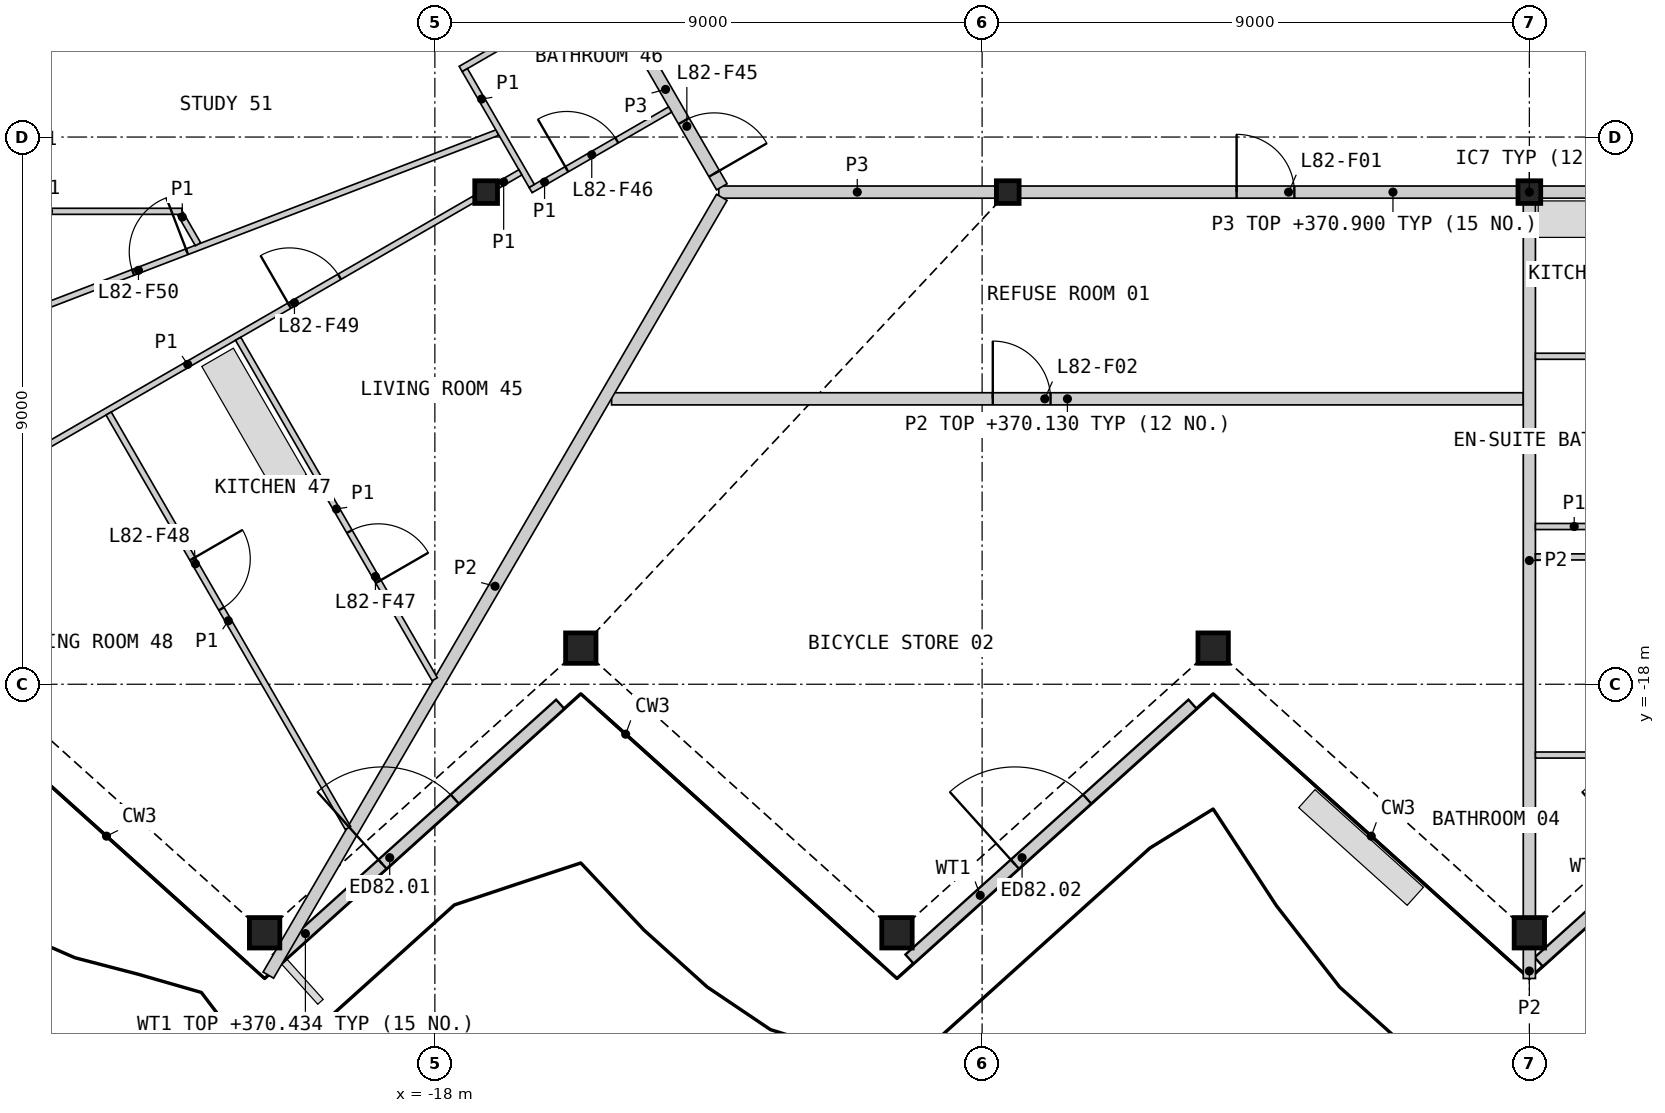
"""IFC4 building model, lengths in metres.
Left out: names, types, materials, properties, quantities, classifications, styles, units other than length and angle.
Written with IfcOpenShell. Run it as: python <this file> out.ifc"""

import sys

from ifc_helpers import new_model, si_unit, direction, frame, frame_2d, origin, origin_2d, place, context, subcontext, project, spatial, rectangle, hollow_rectangle, i_section, extrude, element, fill, save


model = new_model("IFC4")
c1 = context("Model", 3, precision=1e-05, world=origin(), true_north=direction((0.0, 1.0)))
c2 = subcontext(c1, "Body", "Model", "MODEL_VIEW")
j1 = project(units=[si_unit("LENGTHUNIT", "METRE"), si_unit("PLANEANGLEUNIT", "RADIAN")], contexts=[c1])
p1 = place(None, origin())
s1 = spatial("IfcSite", under=j1, at=p1, CompositionType="ELEMENT")
p2 = place(p1, origin())
s2 = spatial("IfcBuilding", under=s1, at=p2, CompositionType="ELEMENT")
p3 = place(p2, frame((0.0, 0.0, 367.8)))
s3 = spatial("IfcBuildingStorey", under=s2, at=p3, CompositionType="ELEMENT", Elevation=367.8)
for number, where, z_axis, x_axis in (
    (1, (-20.8, -22.088, 0.0), (0.0, 0.0, 1.0), (1.0, 0.0, 0.0)),
    (2, (-15.6, -17.406, 0.0), (0.0, 0.0, 1.0), (1.0, 0.0, 0.0)),
    (3, (-10.4, -22.088, 0.0), (0.0, 0.0, 1.0), (1.0, 0.0, 0.0)),
    (4, (-5.2, -17.406, 0.0), (0.0, 0.0, 1.0), (1.0, 0.0, 0.0)),
    (5, (0.0, -22.088, 0.0), (0.0, 0.0, 1.0), (1.0, 0.0, 0.0)),
):
    element("IfcColumn", number, at=place(p3, frame(where, z_axis=z_axis, x_axis=x_axis)), inside=s3, PredefinedType="COLUMN", context=c2, shape_type="SweptSolid", body=[
        extrude(hollow_rectangle(XDim=0.5, YDim=0.5, WallThickness=0.03, at=origin_2d()), origin(), (0.0, 0.0, 1.0), 3.4),
    ])
for number, where, z_axis, x_axis in (
    (6, (-17.157, -9.906, 0.0), (0.0, 0.0, 1.0), (1.0, 0.0, 0.0)),
    (7, (-8.578, -9.906, 0.0), (0.0, 0.0, 1.0), (1.0, 0.0, 0.0)),
    (8, (0.0, -9.906, 0.0), (0.0, 0.0, 1.0), (1.0, 0.0, 0.0)),
):
    element("IfcColumn", number, at=place(p3, frame(where, z_axis=z_axis, x_axis=x_axis)), inside=s3, PredefinedType="COLUMN", context=c2, shape_type="SweptSolid", body=[
        extrude(i_section(OverallWidth=0.374, OverallDepth=0.372, WebThickness=0.016, FlangeThickness=0.026, at=origin_2d()), origin(), (0.0, 0.0, 1.0), 3.4),
    ])
p4 = place(p3, frame((-20.595, -22.52, 0.0), z_axis=(0.0, 0.0, 1.0), x_axis=(0.743137181878, 0.669139095339, 0.0)))
e9 = element("IfcWall", 9, at=p4, inside=s3, PredefinedType="SOLIDWALL", context=c2, shape_type="SweptSolid", body=[
    extrude(rectangle(XDim=6.265, YDim=0.2, at=frame_2d((3.133, 0.0))), origin(), (0.0, 0.0, 1.0), 2.634),
])
p5 = place(p4, frame((2.333, 0.0, 0.0)))
e10 = element("IfcOpeningElement", 10, at=p5, cuts=e9, PredefinedType="OPENING", context=c2, shape_type="SweptSolid", body=[
    extrude(rectangle(XDim=1.6, YDim=2.25, at=frame_2d((0.8, 1.125))), frame((0.0, 0.11, 0.0), z_axis=(0.0, -1.0, 0.0), x_axis=(1.0, 0.0, 0.0)), (0.0, 0.0, 1.0), 0.22),
])
p6 = place(p3, frame((-10.195, -22.52, 0.0), z_axis=(0.0, 0.0, 1.0), x_axis=(0.743137181878, 0.669139095339, 0.0)))
e11 = element("IfcWall", 11, at=p6, inside=s3, PredefinedType="SOLIDWALL", context=c2, shape_type="SweptSolid", body=[
    extrude(rectangle(XDim=6.265, YDim=0.2, at=frame_2d((3.133, 0.0))), origin(), (0.0, 0.0, 1.0), 2.634),
])
p7 = place(p6, frame((2.333, 0.0, 0.0)))
e12 = element("IfcOpeningElement", 12, at=p7, cuts=e11, PredefinedType="OPENING", context=c2, shape_type="SweptSolid", body=[
    extrude(rectangle(XDim=1.6, YDim=2.25, at=frame_2d((0.8, 1.125))), frame((0.0, 0.11, 0.0), z_axis=(0.0, -1.0, 0.0), x_axis=(1.0, 0.0, 0.0)), (0.0, 0.0, 1.0), 0.22),
])
p8 = place(p3, frame((0.154, -22.567, 0.0), z_axis=(0.0, 0.0, 1.0), x_axis=(0.743150529995, 0.669124270796, 0.0)))
e13 = element("IfcWall", 13, at=p8, inside=s3, PredefinedType="SOLIDWALL", context=c2, shape_type="SweptSolid", body=[
    extrude(rectangle(XDim=6.678, YDim=0.2, at=frame_2d((3.339, 0.0))), origin(), (0.0, 0.0, 1.0), 2.634),
])
p9 = place(p8, frame((2.402, 0.0, 0.0)))
e14 = element("IfcOpeningElement", 14, at=p9, cuts=e13, PredefinedType="OPENING", context=c2, shape_type="SweptSolid", body=[
    extrude(rectangle(XDim=1.6, YDim=2.25, at=frame_2d((0.8, 1.125))), frame((0.0, 0.11, 0.0), z_axis=(0.0, -1.0, 0.0), x_axis=(1.0, 0.0, 0.0)), (0.0, 0.0, 1.0), 0.22),
])
p10 = place(p3, frame((-8.382, -9.906, 0.0), z_axis=(0.0, 0.0, 1.0), x_axis=(1.0, 0.0, 0.0)))
e15 = element("IfcWall", 15, at=p10, inside=s3, PredefinedType="PARTITIONING", context=c2, shape_type="SweptSolid", body=[
    extrude(rectangle(XDim=8.185, YDim=0.2, at=frame_2d((4.092, 0.0))), origin(), (0.0, 0.0, 1.0), 3.1),
])
p11 = place(p10, frame((3.567, 0.0, 0.0)))
e16 = element("IfcOpeningElement", 16, at=p11, cuts=e15, PredefinedType="OPENING", context=c2, shape_type="SweptSolid", body=[
    extrude(rectangle(XDim=0.95, YDim=2.1, at=frame_2d((0.475, 1.05))), frame((0.0, 0.11, 0.0), z_axis=(0.0, -1.0, 0.0), x_axis=(1.0, 0.0, 0.0)), (0.0, 0.0, 1.0), 0.22),
])
p12 = place(p3, frame((0.197, -9.906, 0.0), z_axis=(0.0, 0.0, 1.0), x_axis=(1.0, 0.0, 0.0)))
e17 = element("IfcWall", 17, at=p12, inside=s3, PredefinedType="PARTITIONING", context=c2, shape_type="SweptSolid", body=[
    extrude(rectangle(XDim=8.185, YDim=0.2, at=frame_2d((4.092, 0.0))), origin(), (0.0, 0.0, 1.0), 3.1),
])
p13 = place(p12, frame((3.39, 0.0, 0.0)))
e18 = element("IfcOpeningElement", 18, at=p13, cuts=e17, PredefinedType="OPENING", context=c2, shape_type="SweptSolid", body=[
    extrude(rectangle(XDim=1.0, YDim=2.1, at=frame_2d((0.5, 1.05))), frame((0.0, 0.11, 0.0), z_axis=(0.0, -1.0, 0.0), x_axis=(1.0, 0.0, 0.0)), (0.0, 0.0, 1.0), 0.22),
])
p14 = place(p3, frame((-13.331, -9.906, 0.0), z_axis=(0.0, 0.0, 1.0), x_axis=(1.0, 0.0, 0.0)))
e19 = element("IfcWall", 19, at=p14, inside=s3, PredefinedType="PARTITIONING", context=c2, shape_type="SweptSolid", body=[
    extrude(rectangle(XDim=4.555, YDim=0.2, at=frame_2d((2.278, 0.0))), origin(), (0.0, 0.0, 1.0), 3.1),
])
p15 = place(p3, frame((-15.131, -6.614, 0.0), z_axis=(0.0, 0.0, 1.0), x_axis=(0.499948957823, -0.866054870994, 0.0)))
e20 = element("IfcWall", 20, at=p15, inside=s3, PredefinedType="PARTITIONING", context=c2, shape_type="SweptSolid", body=[
    extrude(rectangle(XDim=3.701, YDim=0.2, at=frame_2d((1.851, 0.0))), origin(), (0.0, 0.0, 1.0), 3.1),
])
p16 = place(p15, frame((2.451, 0.0, 0.0)))
e21 = element("IfcOpeningElement", 21, at=p16, cuts=e20, PredefinedType="OPENING", context=c2, shape_type="SweptSolid", body=[
    extrude(rectangle(XDim=1.0, YDim=2.1, at=frame_2d((0.5, 1.05))), frame((0.0, 0.11, 0.0), z_axis=(0.0, -1.0, 0.0), x_axis=(1.0, 0.0, 0.0)), (0.0, 0.0, 1.0), 0.22),
])
p17 = place(p3, frame((-15.094, -13.306, 0.0), z_axis=(0.0, 0.0, 1.0), x_axis=(1.0, 0.0, 0.0)))
e22 = element("IfcWall", 22, at=p17, inside=s3, PredefinedType="PARTITIONING", context=c2, shape_type="SweptSolid", body=[
    extrude(rectangle(XDim=14.994, YDim=0.2, at=frame_2d((7.497, 0.0))), origin(), (0.0, 0.0, 1.0), 2.33),
])
p18 = place(p17, frame((6.27, 0.0, 0.0)))
e23 = element("IfcOpeningElement", 23, at=p18, cuts=e22, PredefinedType="OPENING", context=c2, shape_type="SweptSolid", body=[
    extrude(rectangle(XDim=0.95, YDim=2.1, at=frame_2d((0.475, 1.05))), frame((0.0, 0.11, 0.0), z_axis=(0.0, -1.0, 0.0), x_axis=(1.0, 0.0, 0.0)), (0.0, 0.0, 1.0), 0.22),
])
p19 = place(p3, frame((-20.739, -22.784, 0.0), z_axis=(0.0, 0.0, 1.0), x_axis=(0.50362599185, 0.863921790635, 0.0)))
e24 = element("IfcWall", 24, at=p19, inside=s3, PredefinedType="PARTITIONING", context=c2, shape_type="SweptSolid", body=[
    extrude(rectangle(XDim=14.807, YDim=0.2, at=frame_2d((7.404, 0.0))), origin(), (0.0, 0.0, 1.0), 2.33),
])
p20 = place(p3, frame((0.0, -21.828, 0.0), z_axis=(0.0, 0.0, 1.0), x_axis=(0.0, 1.0, 0.0)))
e25 = element("IfcWall", 25, at=p20, inside=s3, PredefinedType="PARTITIONING", context=c2, shape_type="SweptSolid", body=[
    extrude(rectangle(XDim=11.725, YDim=0.2, at=frame_2d((5.863, 0.0))), origin(), (0.0, 0.0, 1.0), 2.33),
])
p21 = place(p3, frame((0.0, -22.839, 0.0), z_axis=(0.0, 0.0, 1.0), x_axis=(0.0, 1.0, 0.0)))
e26 = element("IfcWall", 26, at=p21, inside=s3, PredefinedType="PARTITIONING", context=c2, shape_type="SweptSolid", body=[
    extrude(rectangle(XDim=0.491, YDim=0.2, at=frame_2d((0.246, 0.0))), origin(), (0.0, 0.0, 1.0), 2.33),
])
p22 = place(p3, frame((-28.725, -13.438, 0.0), z_axis=(0.0, 0.0, 1.0), x_axis=(0.933580312145, 0.358368247444, 0.0)))
e27 = element("IfcWall", 27, at=p22, inside=s3, PredefinedType="PARTITIONING", context=c2, shape_type="SweptSolid", body=[
    extrude(rectangle(XDim=12.59, YDim=0.1, at=frame_2d((6.295, 0.0))), origin(), (0.0, 0.0, 1.0), 2.33),
])
p23 = place(p22, frame((6.171, 0.0, 0.0)))
e28 = element("IfcOpeningElement", 28, at=p23, cuts=e27, PredefinedType="OPENING", context=c2, shape_type="SweptSolid", body=[
    extrude(rectangle(XDim=0.95, YDim=2.1, at=frame_2d((0.475, 1.05))), frame((0.0, 0.06, 0.0), z_axis=(0.0, -1.0, 0.0), x_axis=(1.0, 0.0, 0.0)), (0.0, 0.0, 1.0), 0.12),
])
p24 = place(p3, frame((-26.777, -15.46, 0.0), z_axis=(0.0, 0.0, 1.0), x_axis=(0.866019680922, 0.500009912158, 0.0)))
e29 = element("IfcWall", 29, at=p24, inside=s3, PredefinedType="PARTITIONING", context=c2, shape_type="SweptSolid", body=[
    extrude(rectangle(XDim=10.881, YDim=0.1, at=frame_2d((5.44, 0.0))), origin(), (0.0, 0.0, 1.0), 2.33),
])
p25 = place(p24, frame((7.373, 0.0, 0.0)))
e30 = element("IfcOpeningElement", 30, at=p25, cuts=e29, PredefinedType="OPENING", context=c2, shape_type="SweptSolid", body=[
    extrude(rectangle(XDim=0.95, YDim=2.1, at=frame_2d((0.475, 1.05))), frame((0.0, 0.06, 0.0), z_axis=(0.0, -1.0, 0.0), x_axis=(1.0, 0.0, 0.0)), (0.0, 0.0, 1.0), 0.12),
])
p26 = place(p3, frame((-23.365, -13.548, 0.0), z_axis=(0.0, 0.0, 1.0), x_axis=(0.500011483804, -0.866018773506, 0.0)))
e31 = element("IfcWall", 31, at=p26, inside=s3, PredefinedType="PARTITIONING", context=c2, shape_type="SweptSolid", body=[
    extrude(rectangle(XDim=7.872, YDim=0.1, at=frame_2d((3.936, 0.0))), origin(), (0.0, 0.0, 1.0), 2.33),
])
p27 = place(p26, frame((2.759, 0.0, 0.0)))
e32 = element("IfcOpeningElement", 32, at=p27, cuts=e31, PredefinedType="OPENING", context=c2, shape_type="SweptSolid", body=[
    extrude(rectangle(XDim=0.95, YDim=2.1, at=frame_2d((0.475, 1.05))), frame((0.0, 0.06, 0.0), z_axis=(0.0, -1.0, 0.0), x_axis=(1.0, 0.0, 0.0)), (0.0, 0.0, 1.0), 0.12),
])
p28 = place(p3, frame((-21.235, -12.318, 0.0), z_axis=(0.0, 0.0, 1.0), x_axis=(0.500008973052, -0.866020223129, 0.0)))
e33 = element("IfcWall", 33, at=p28, inside=s3, PredefinedType="PARTITIONING", context=c2, shape_type="SweptSolid", body=[
    extrude(rectangle(XDim=6.466, YDim=0.1, at=frame_2d((3.233, 0.0))), origin(), (0.0, 0.0, 1.0), 2.33),
])
p29 = place(p28, frame((3.661, 0.0, 0.0)))
e34 = element("IfcOpeningElement", 34, at=p29, cuts=e33, PredefinedType="OPENING", context=c2, shape_type="SweptSolid", body=[
    extrude(rectangle(XDim=0.95, YDim=2.1, at=frame_2d((0.475, 1.05))), frame((0.0, 0.06, 0.0), z_axis=(0.0, -1.0, 0.0), x_axis=(1.0, 0.0, 0.0)), (0.0, 0.0, 1.0), 0.12),
])
p30 = place(p3, frame((-26.549, -10.222, 0.0), z_axis=(0.0, 0.0, 1.0), x_axis=(1.0, 0.0, 0.0)))
e35 = element("IfcWall", 35, at=p30, inside=s3, PredefinedType="PARTITIONING", context=c2, shape_type="SweptSolid", body=[
    extrude(rectangle(XDim=4.391, YDim=0.1, at=frame_2d((2.195, 0.0))), origin(), (0.0, 0.0, 1.0), 2.33),
])
p31 = place(p3, frame((0.1, -19.164, 0.0), z_axis=(0.0, 0.0, 1.0), x_axis=(1.0, 0.0, 0.0)))
e36 = element("IfcWall", 36, at=p31, inside=s3, PredefinedType="PARTITIONING", context=c2, shape_type="SweptSolid", body=[
    extrude(rectangle(XDim=3.751, YDim=0.1, at=frame_2d((1.876, 0.0))), origin(), (0.0, 0.0, 1.0), 2.33),
])
p32 = place(p31, frame((2.579, 0.0, 0.0)))
e37 = element("IfcOpeningElement", 37, at=p32, cuts=e36, PredefinedType="OPENING", context=c2, shape_type="SweptSolid", body=[
    extrude(rectangle(XDim=0.95, YDim=2.1, at=frame_2d((0.475, 1.05))), frame((0.0, 0.06, 0.0), z_axis=(0.0, -1.0, 0.0), x_axis=(1.0, 0.0, 0.0)), (0.0, 0.0, 1.0), 0.12),
])
p33 = place(p3, frame((0.1, -15.906, 0.0), z_axis=(0.0, 0.0, 1.0), x_axis=(1.0, 0.0, 0.0)))
e38 = element("IfcWall", 38, at=p33, inside=s3, PredefinedType="PARTITIONING", context=c2, shape_type="SweptSolid", body=[
    extrude(rectangle(XDim=2.85, YDim=0.1, at=frame_2d((1.425, 0.0))), origin(), (0.0, 0.0, 1.0), 2.33),
])
p34 = place(p3, frame((0.1, -12.606, 0.0), z_axis=(0.0, 0.0, 1.0), x_axis=(1.0, 0.0, 0.0)))
e39 = element("IfcWall", 39, at=p34, inside=s3, PredefinedType="PARTITIONING", context=c2, shape_type="SweptSolid", body=[
    extrude(rectangle(XDim=2.55, YDim=0.1, at=frame_2d((1.275, 0.0))), origin(), (0.0, 0.0, 1.0), 2.33),
])
p35 = place(p3, frame((0.1, -15.406, 0.0), z_axis=(0.0, 0.0, 1.0), x_axis=(1.0, 0.0, 0.0)))
e40 = element("IfcWall", 40, at=p35, inside=s3, PredefinedType="PARTITIONING", context=c2, shape_type="SweptSolid", body=[
    extrude(rectangle(XDim=2.55, YDim=0.1, at=frame_2d((1.275, 0.0))), origin(), (0.0, 0.0, 1.0), 2.33),
])
p36 = place(p35, frame((1.35, 0.0, 0.0)))
e41 = element("IfcOpeningElement", 41, at=p36, cuts=e40, PredefinedType="OPENING", context=c2, shape_type="SweptSolid", body=[
    extrude(rectangle(XDim=0.95, YDim=2.1, at=frame_2d((0.475, 1.05))), frame((0.0, 0.06, 0.0), z_axis=(0.0, -1.0, 0.0), x_axis=(1.0, 0.0, 0.0)), (0.0, 0.0, 1.0), 0.12),
])
p37 = place(p3, frame((-17.575, -7.881, 0.0), z_axis=(0.0, 0.0, 1.0), x_axis=(0.866013657776, 0.500020344131, 0.0)))
e42 = element("IfcWall", 42, at=p37, inside=s3, PredefinedType="PARTITIONING", context=c2, shape_type="SweptSolid", body=[
    extrude(rectangle(XDim=2.625, YDim=0.1, at=frame_2d((1.312, 0.0))), origin(), (0.0, 0.0, 1.0), 2.33),
])
p38 = place(p3, frame((-16.426, -9.872, 0.0), z_axis=(0.0, 0.0, 1.0), x_axis=(0.866029095148, 0.499993606316, 0.0)))
e43 = element("IfcWall", 43, at=p38, inside=s3, PredefinedType="PARTITIONING", context=c2, shape_type="SweptSolid", body=[
    extrude(rectangle(XDim=2.65, YDim=0.1, at=frame_2d((1.325, 0.0))), origin(), (0.0, 0.0, 1.0), 2.33),
])
p39 = place(p38, frame((0.686, 0.0, 0.0)))
e44 = element("IfcOpeningElement", 44, at=p39, cuts=e43, PredefinedType="OPENING", context=c2, shape_type="SweptSolid", body=[
    extrude(rectangle(XDim=0.95, YDim=2.1, at=frame_2d((0.475, 1.05))), frame((0.0, 0.06, 0.0), z_axis=(0.0, -1.0, 0.0), x_axis=(1.0, 0.0, 0.0)), (0.0, 0.0, 1.0), 0.12),
])
p40 = place(p3, frame((-17.507, -7.899, 0.0), z_axis=(0.0, 0.0, 1.0), x_axis=(0.499946605688, -0.86605622881, 0.0)))
e45 = element("IfcWall", 45, at=p40, inside=s3, PredefinedType="PARTITIONING", context=c2, shape_type="SweptSolid", body=[
    extrude(rectangle(XDim=2.2, YDim=0.1, at=frame_2d((1.1, 0.0))), origin(), (0.0, 0.0, 1.0), 2.33),
])
p41 = place(p3, frame((-22.183, -10.265, 0.0), z_axis=(0.0, 0.0, 1.0), x_axis=(0.500016142392, -0.86601608377, 0.0)))
e46 = element("IfcWall", 46, at=p41, inside=s3, PredefinedType="PARTITIONING", context=c2, shape_type="SweptSolid", body=[
    extrude(rectangle(XDim=0.576, YDim=0.1, at=frame_2d((0.288, 0.0))), origin(), (0.0, 0.0, 1.0), 2.33),
])
p42 = place(p3, frame((-16.96, -9.792, 0.0), z_axis=(0.0, 0.0, 1.0), x_axis=(0.866137484628, 0.499805820016, 0.0)))
e47 = element("IfcWall", 47, at=p42, inside=s3, PredefinedType="PARTITIONING", context=c2, shape_type="SweptSolid", body=[
    extrude(rectangle(XDim=0.423, YDim=0.1, at=frame_2d((0.211, 0.0))), origin(), (0.0, 0.0, 1.0), 2.33),
])
p43 = place(p5, origin())
e48 = element("IfcDoor", 48, at=p43, inside=s3, OperationType="DOUBLE_DOOR_SINGLE_SWING", PredefinedType="DOOR", context=c2, shape_type="SweptSolid", body=[
    extrude(rectangle(XDim=1.6, YDim=2.25, at=frame_2d((0.8, 1.125))), frame((0.0, 0.025, 0.0), z_axis=(0.0, -1.0, 0.0), x_axis=(1.0, 0.0, 0.0)), (0.0, 0.0, 1.0), 0.05),
])
fill(e10, e48)
p44 = place(p7, origin())
e49 = element("IfcDoor", 49, at=p44, inside=s3, OperationType="DOUBLE_DOOR_SINGLE_SWING", PredefinedType="DOOR", context=c2, shape_type="SweptSolid", body=[
    extrude(rectangle(XDim=1.6, YDim=2.25, at=frame_2d((0.8, 1.125))), frame((0.0, 0.025, 0.0), z_axis=(0.0, -1.0, 0.0), x_axis=(1.0, 0.0, 0.0)), (0.0, 0.0, 1.0), 0.05),
])
fill(e12, e49)
p45 = place(p11, origin())
e50 = element("IfcDoor", 50, at=p45, inside=s3, OperationType="SINGLE_SWING_LEFT", PredefinedType="DOOR", context=c2, shape_type="SweptSolid", body=[
    extrude(rectangle(XDim=0.95, YDim=2.1, at=frame_2d((0.475, 1.05))), frame((0.0, 0.025, 0.0), z_axis=(0.0, -1.0, 0.0), x_axis=(1.0, 0.0, 0.0)), (0.0, 0.0, 1.0), 0.05),
])
fill(e16, e50)
p46 = place(p18, origin())
e51 = element("IfcDoor", 51, at=p46, inside=s3, OperationType="SINGLE_SWING_LEFT", PredefinedType="DOOR", context=c2, shape_type="SweptSolid", body=[
    extrude(rectangle(XDim=0.95, YDim=2.1, at=frame_2d((0.475, 1.05))), frame((0.0, 0.025, 0.0), z_axis=(0.0, -1.0, 0.0), x_axis=(1.0, 0.0, 0.0)), (0.0, 0.0, 1.0), 0.05),
])
fill(e23, e51)
p47 = place(p16, origin())
e52 = element("IfcDoor", 52, at=p47, inside=s3, OperationType="SINGLE_SWING_RIGHT", PredefinedType="DOOR", context=c2, shape_type="SweptSolid", body=[
    extrude(rectangle(XDim=1.0, YDim=2.1, at=frame_2d((0.5, 1.05))), frame((0.0, 0.025, 0.0), z_axis=(0.0, -1.0, 0.0), x_axis=(1.0, 0.0, 0.0)), (0.0, 0.0, 1.0), 0.05),
])
fill(e21, e52)
p48 = place(p39, origin())
e53 = element("IfcDoor", 53, at=p48, inside=s3, OperationType="SINGLE_SWING_LEFT", PredefinedType="DOOR", context=c2, shape_type="SweptSolid", body=[
    extrude(rectangle(XDim=0.95, YDim=2.1, at=frame_2d((0.475, 1.05))), frame((0.0, 0.025, 0.0), z_axis=(0.0, -1.0, 0.0), x_axis=(1.0, 0.0, 0.0)), (0.0, 0.0, 1.0), 0.05),
])
fill(e44, e53)
p49 = place(p29, origin())
e54 = element("IfcDoor", 54, at=p49, inside=s3, OperationType="SINGLE_SWING_RIGHT", PredefinedType="DOOR", context=c2, shape_type="SweptSolid", body=[
    extrude(rectangle(XDim=0.95, YDim=2.1, at=frame_2d((0.475, 1.05))), frame((0.0, 0.025, 0.0), z_axis=(0.0, -1.0, 0.0), x_axis=(1.0, 0.0, 0.0)), (0.0, 0.0, 1.0), 0.05),
])
fill(e34, e54)
p50 = place(p27, origin())
e55 = element("IfcDoor", 55, at=p50, inside=s3, OperationType="SINGLE_SWING_LEFT", PredefinedType="DOOR", context=c2, shape_type="SweptSolid", body=[
    extrude(rectangle(XDim=0.95, YDim=2.1, at=frame_2d((0.475, 1.05))), frame((0.0, 0.025, 0.0), z_axis=(0.0, -1.0, 0.0), x_axis=(1.0, 0.0, 0.0)), (0.0, 0.0, 1.0), 0.05),
])
fill(e32, e55)
p51 = place(p25, origin())
e56 = element("IfcDoor", 56, at=p51, inside=s3, OperationType="SINGLE_SWING_LEFT", PredefinedType="DOOR", context=c2, shape_type="SweptSolid", body=[
    extrude(rectangle(XDim=0.95, YDim=2.1, at=frame_2d((0.475, 1.05))), frame((0.0, 0.025, 0.0), z_axis=(0.0, -1.0, 0.0), x_axis=(1.0, 0.0, 0.0)), (0.0, 0.0, 1.0), 0.05),
])
fill(e30, e56)
p52 = place(p23, origin())
e57 = element("IfcDoor", 57, at=p52, inside=s3, OperationType="SINGLE_SWING_RIGHT", PredefinedType="DOOR", context=c2, shape_type="SweptSolid", body=[
    extrude(rectangle(XDim=0.95, YDim=2.1, at=frame_2d((0.475, 1.05))), frame((0.0, 0.025, 0.0), z_axis=(0.0, -1.0, 0.0), x_axis=(1.0, 0.0, 0.0)), (0.0, 0.0, 1.0), 0.05),
])
fill(e28, e57)
save(model, sys.argv[1])
